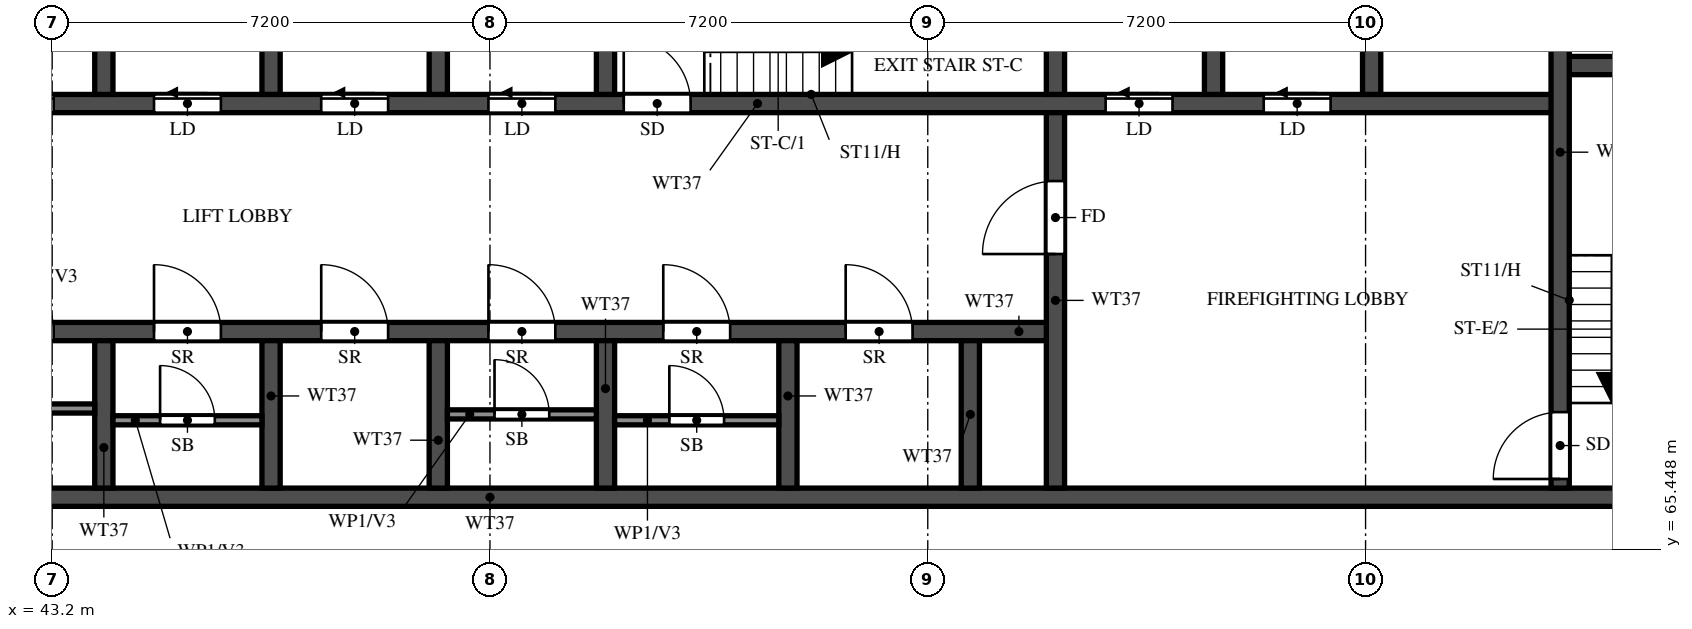
"""IFC4 building model, lengths in metres.
Left out: names, types, materials, properties, quantities, classifications, styles, units other than length and angle.
Written with IfcOpenShell. Run it as: python <this file> out.ifc"""

import sys

from ifc_helpers import new_model, si_unit, direction, frame, frame_2d, origin, place, context, subcontext, project, spatial, rectangle, extrude, element, fill, save


model = new_model("IFC4")
c1 = context("Model", 3, precision=1e-05, world=origin(), true_north=direction((0.0, 1.0)))
c2 = subcontext(c1, "Body", "Model", "MODEL_VIEW")
j1 = project(units=[si_unit("LENGTHUNIT", "METRE"), si_unit("PLANEANGLEUNIT", "RADIAN")], contexts=[c1])
p1 = place(None, origin())
s1 = spatial("IfcSite", under=j1, at=p1, CompositionType="ELEMENT")
p2 = place(p1, origin())
s2 = spatial("IfcBuilding", under=s1, at=p2, CompositionType="ELEMENT")
p3 = place(p2, frame((0.0, 0.0, 260.5)))
s3 = spatial("IfcBuildingStorey", under=s2, at=p3, CompositionType="ELEMENT", Elevation=260.5)
p4 = place(p3, frame((29.2, 66.3, 0.0), z_axis=(0.0, 0.0, 1.0), x_axis=(1.0, 0.0, 0.0)))
e1 = element("IfcWall", 1, at=p4, inside=s3, PredefinedType="SHEAR", context=c2, shape_type="SweptSolid", body=[
    extrude(rectangle(XDim=42.4, YDim=0.3, at=frame_2d((21.2, 0.0))), origin(), (0.0, 0.0, 1.0), 3.22),
])
p5 = place(p4, frame((1.425, 0.0, 0.0)))
e2 = element("IfcOpeningElement", 2, at=p5, cuts=e1, PredefinedType="OPENING", context=c2, shape_type="SweptSolid", body=[
    extrude(rectangle(XDim=1.1, YDim=2.1, at=frame_2d((0.55, 1.05))), frame((0.0, 0.16, 0.0), z_axis=(0.0, -1.0, 0.0), x_axis=(1.0, 0.0, 0.0)), (0.0, 0.0, 1.0), 0.32),
])
p6 = place(p4, frame((4.2, 0.0, 0.0)))
e3 = element("IfcOpeningElement", 3, at=p6, cuts=e1, PredefinedType="OPENING", context=c2, shape_type="SweptSolid", body=[
    extrude(rectangle(XDim=1.8, YDim=2.1, at=frame_2d((0.9, 1.05))), frame((0.0, 0.16, 0.0), z_axis=(0.0, -1.0, 0.0), x_axis=(1.0, 0.0, 0.0)), (0.0, 0.0, 1.0), 0.32),
])
p7 = place(p3, frame((35.65, 69.025, 0.0), z_axis=(0.0, 0.0, 1.0), x_axis=(1.0, 0.0, 0.0)))
e4 = element("IfcWall", 4, at=p7, inside=s3, PredefinedType="SHEAR", context=c2, shape_type="SweptSolid", body=[
    extrude(rectangle(XDim=24.05, YDim=0.3, at=frame_2d((12.025, 0.0))), origin(), (0.0, 0.0, 1.0), 3.22),
])
p8 = place(p7, frame((0.975, 0.0, 0.0)))
e5 = element("IfcOpeningElement", 5, at=p8, cuts=e4, PredefinedType="OPENING", context=c2, shape_type="SweptSolid", body=[
    extrude(rectangle(XDim=1.1, YDim=2.1, at=frame_2d((0.55, 1.05))), frame((0.0, 0.16, 0.0), z_axis=(0.0, -1.0, 0.0), x_axis=(1.0, 0.0, 0.0)), (0.0, 0.0, 1.0), 0.32),
])
p9 = place(p7, frame((3.725, 0.0, 0.0)))
e6 = element("IfcOpeningElement", 6, at=p9, cuts=e4, PredefinedType="OPENING", context=c2, shape_type="SweptSolid", body=[
    extrude(rectangle(XDim=1.1, YDim=2.1, at=frame_2d((0.55, 1.05))), frame((0.0, 0.16, 0.0), z_axis=(0.0, -1.0, 0.0), x_axis=(1.0, 0.0, 0.0)), (0.0, 0.0, 1.0), 0.32),
])
p10 = place(p7, frame((6.475, 0.0, 0.0)))
e7 = element("IfcOpeningElement", 7, at=p10, cuts=e4, PredefinedType="OPENING", context=c2, shape_type="SweptSolid", body=[
    extrude(rectangle(XDim=1.1, YDim=2.1, at=frame_2d((0.55, 1.05))), frame((0.0, 0.16, 0.0), z_axis=(0.0, -1.0, 0.0), x_axis=(1.0, 0.0, 0.0)), (0.0, 0.0, 1.0), 0.32),
])
p11 = place(p7, frame((9.225, 0.0, 0.0)))
e8 = element("IfcOpeningElement", 8, at=p11, cuts=e4, PredefinedType="OPENING", context=c2, shape_type="SweptSolid", body=[
    extrude(rectangle(XDim=1.1, YDim=2.1, at=frame_2d((0.55, 1.05))), frame((0.0, 0.16, 0.0), z_axis=(0.0, -1.0, 0.0), x_axis=(1.0, 0.0, 0.0)), (0.0, 0.0, 1.0), 0.32),
])
p12 = place(p7, frame((11.975, 0.0, 0.0)))
e9 = element("IfcOpeningElement", 9, at=p12, cuts=e4, PredefinedType="OPENING", context=c2, shape_type="SweptSolid", body=[
    extrude(rectangle(XDim=1.1, YDim=2.1, at=frame_2d((0.55, 1.05))), frame((0.0, 0.16, 0.0), z_axis=(0.0, -1.0, 0.0), x_axis=(1.0, 0.0, 0.0)), (0.0, 0.0, 1.0), 0.32),
])
p13 = place(p7, frame((14.725, 0.0, 0.0)))
e10 = element("IfcOpeningElement", 10, at=p13, cuts=e4, PredefinedType="OPENING", context=c2, shape_type="SweptSolid", body=[
    extrude(rectangle(XDim=1.1, YDim=2.1, at=frame_2d((0.55, 1.05))), frame((0.0, 0.16, 0.0), z_axis=(0.0, -1.0, 0.0), x_axis=(1.0, 0.0, 0.0)), (0.0, 0.0, 1.0), 0.32),
])
p14 = place(p7, frame((17.6, 0.0, 0.0)))
e11 = element("IfcOpeningElement", 11, at=p14, cuts=e4, PredefinedType="OPENING", context=c2, shape_type="SweptSolid", body=[
    extrude(rectangle(XDim=1.1, YDim=2.1, at=frame_2d((0.55, 1.05))), frame((0.0, 0.16, 0.0), z_axis=(0.0, -1.0, 0.0), x_axis=(1.0, 0.0, 0.0)), (0.0, 0.0, 1.0), 0.32),
])
p15 = place(p7, frame((20.6, 0.0, 0.0)))
e12 = element("IfcOpeningElement", 12, at=p15, cuts=e4, PredefinedType="OPENING", context=c2, shape_type="SweptSolid", body=[
    extrude(rectangle(XDim=1.1, YDim=2.1, at=frame_2d((0.55, 1.05))), frame((0.0, 0.16, 0.0), z_axis=(0.0, -1.0, 0.0), x_axis=(1.0, 0.0, 0.0)), (0.0, 0.0, 1.0), 0.32),
])
p16 = place(p3, frame((32.8, 72.775, 0.0), z_axis=(0.0, 0.0, 1.0), x_axis=(1.0, 0.0, 0.0)))
e13 = element("IfcWall", 13, at=p16, inside=s3, PredefinedType="SHEAR", context=c2, shape_type="SweptSolid", body=[
    extrude(rectangle(XDim=35.2, YDim=0.3, at=frame_2d((17.6, 0.0))), origin(), (0.0, 0.0, 1.0), 3.22),
])
p17 = place(p16, frame((19.8, 0.0, 0.0)))
e14 = element("IfcOpeningElement", 14, at=p17, cuts=e13, PredefinedType="OPENING", context=c2, shape_type="SweptSolid", body=[
    extrude(rectangle(XDim=1.1, YDim=2.1, at=frame_2d((0.55, 1.05))), frame((0.0, 0.16, 0.0), z_axis=(0.0, -1.0, 0.0), x_axis=(1.0, 0.0, 0.0)), (0.0, 0.0, 1.0), 0.32),
])
p18 = place(p16, frame((27.725, 0.0, 0.0)))
e15 = element("IfcOpeningElement", 15, at=p18, cuts=e13, PredefinedType="OPENING", context=c2, shape_type="SweptSolid", body=[
    extrude(rectangle(XDim=1.1, YDim=2.1, at=frame_2d((0.55, 1.05))), frame((0.0, 0.16, 0.0), z_axis=(0.0, -1.0, 0.0), x_axis=(1.0, 0.0, 0.0)), (0.0, 0.0, 1.0), 0.32),
])
p19 = place(p16, frame((30.325, 0.0, 0.0)))
e16 = element("IfcOpeningElement", 16, at=p19, cuts=e13, PredefinedType="OPENING", context=c2, shape_type="SweptSolid", body=[
    extrude(rectangle(XDim=1.1, YDim=2.1, at=frame_2d((0.55, 1.05))), frame((0.0, 0.16, 0.0), z_axis=(0.0, -1.0, 0.0), x_axis=(1.0, 0.0, 0.0)), (0.0, 0.0, 1.0), 0.32),
])
p20 = place(p16, frame((3.825, 0.0, 0.0)))
e17 = element("IfcOpeningElement", 17, at=p20, cuts=e13, PredefinedType="OPENING", context=c2, shape_type="SweptSolid", body=[
    extrude(rectangle(XDim=1.1, YDim=2.1, at=frame_2d((0.55, 1.05))), frame((0.0, 0.16, 0.0), z_axis=(0.0, -1.0, 0.0), x_axis=(1.0, 0.0, 0.0)), (0.0, 0.0, 1.0), 0.32),
])
p21 = place(p16, frame((6.575, 0.0, 0.0)))
e18 = element("IfcOpeningElement", 18, at=p21, cuts=e13, PredefinedType="OPENING", context=c2, shape_type="SweptSolid", body=[
    extrude(rectangle(XDim=1.1, YDim=2.1, at=frame_2d((0.55, 1.05))), frame((0.0, 0.16, 0.0), z_axis=(0.0, -1.0, 0.0), x_axis=(1.0, 0.0, 0.0)), (0.0, 0.0, 1.0), 0.32),
])
p22 = place(p16, frame((9.325, 0.0, 0.0)))
e19 = element("IfcOpeningElement", 19, at=p22, cuts=e13, PredefinedType="OPENING", context=c2, shape_type="SweptSolid", body=[
    extrude(rectangle(XDim=1.1, YDim=2.1, at=frame_2d((0.55, 1.05))), frame((0.0, 0.16, 0.0), z_axis=(0.0, -1.0, 0.0), x_axis=(1.0, 0.0, 0.0)), (0.0, 0.0, 1.0), 0.32),
])
p23 = place(p16, frame((12.075, 0.0, 0.0)))
e20 = element("IfcOpeningElement", 20, at=p23, cuts=e13, PredefinedType="OPENING", context=c2, shape_type="SweptSolid", body=[
    extrude(rectangle(XDim=1.1, YDim=2.1, at=frame_2d((0.55, 1.05))), frame((0.0, 0.16, 0.0), z_axis=(0.0, -1.0, 0.0), x_axis=(1.0, 0.0, 0.0)), (0.0, 0.0, 1.0), 0.32),
])
p24 = place(p16, frame((14.825, 0.0, 0.0)))
e21 = element("IfcOpeningElement", 21, at=p24, cuts=e13, PredefinedType="OPENING", context=c2, shape_type="SweptSolid", body=[
    extrude(rectangle(XDim=1.1, YDim=2.1, at=frame_2d((0.55, 1.05))), frame((0.0, 0.16, 0.0), z_axis=(0.0, -1.0, 0.0), x_axis=(1.0, 0.0, 0.0)), (0.0, 0.0, 1.0), 0.32),
])
p25 = place(p16, frame((17.575, 0.0, 0.0)))
e22 = element("IfcOpeningElement", 22, at=p25, cuts=e13, PredefinedType="OPENING", context=c2, shape_type="SweptSolid", body=[
    extrude(rectangle(XDim=1.1, YDim=2.1, at=frame_2d((0.55, 1.05))), frame((0.0, 0.16, 0.0), z_axis=(0.0, -1.0, 0.0), x_axis=(1.0, 0.0, 0.0)), (0.0, 0.0, 1.0), 0.32),
])
p26 = place(p16, frame((0.95, 0.0, 0.0)))
e23 = element("IfcOpeningElement", 23, at=p26, cuts=e13, PredefinedType="OPENING", context=c2, shape_type="SweptSolid", body=[
    extrude(rectangle(XDim=1.1, YDim=2.1, at=frame_2d((0.55, 1.05))), frame((0.0, 0.16, 0.0), z_axis=(0.0, -1.0, 0.0), x_axis=(1.0, 0.0, 0.0)), (0.0, 0.0, 1.0), 0.32),
])
p27 = place(p3, frame((68.0, 73.4, 0.0), z_axis=(0.0, 0.0, 1.0), x_axis=(1.0, 0.0, 0.0)))
e24 = element("IfcWall", 24, at=p27, inside=s3, PredefinedType="SHEAR", context=c2, shape_type="SweptSolid", body=[
    extrude(rectangle(XDim=3.1, YDim=0.3, at=frame_2d((1.55, 0.0))), origin(), (0.0, 0.0, 1.0), 3.22),
])
p28 = place(p3, frame((68.0, 66.45, 0.0), z_axis=(0.0, 0.0, 1.0), x_axis=(0.0, 1.0, 0.0)))
e25 = element("IfcWall", 25, at=p28, inside=s3, PredefinedType="SHEAR", context=c2, shape_type="SweptSolid", body=[
    extrude(rectangle(XDim=11.05, YDim=0.3, at=frame_2d((5.525, 0.0))), origin(), (0.0, 0.0, 1.0), 3.22),
])
p29 = place(p28, frame((0.15, 0.0, 0.0)))
e26 = element("IfcOpeningElement", 26, at=p29, cuts=e25, PredefinedType="OPENING", context=c2, shape_type="SweptSolid", body=[
    extrude(rectangle(XDim=1.1, YDim=2.1, at=frame_2d((0.55, 1.05))), frame((0.0, 0.16, 0.0), z_axis=(0.0, -1.0, 0.0), x_axis=(1.0, 0.0, 0.0)), (0.0, 0.0, 1.0), 0.32),
])
p30 = place(p3, frame((59.7, 66.45, 0.0), z_axis=(0.0, 0.0, 1.0), x_axis=(0.0, 1.0, 0.0)))
e27 = element("IfcWall", 27, at=p30, inside=s3, PredefinedType="SHEAR", context=c2, shape_type="SweptSolid", body=[
    extrude(rectangle(XDim=6.175, YDim=0.3, at=frame_2d((3.087, 0.0))), origin(), (0.0, 0.0, 1.0), 3.22),
])
p31 = place(p30, frame((3.85, 0.0, 0.0)))
e28 = element("IfcOpeningElement", 28, at=p31, cuts=e27, PredefinedType="OPENING", context=c2, shape_type="SweptSolid", body=[
    extrude(rectangle(XDim=1.2, YDim=2.1, at=frame_2d((0.6, 1.05))), frame((0.0, 0.16, 0.0), z_axis=(0.0, -1.0, 0.0), x_axis=(1.0, 0.0, 0.0)), (0.0, 0.0, 1.0), 0.32),
])
p32 = place(p3, frame((59.7, 72.925, 0.0), z_axis=(0.0, 0.0, 1.0), x_axis=(0.0, 1.0, 0.0)))
e29 = element("IfcWall", 29, at=p32, inside=s3, PredefinedType="SHEAR", context=c2, shape_type="SweptSolid", body=[
    extrude(rectangle(XDim=2.95, YDim=0.3, at=frame_2d((1.475, 0.0))), origin(), (0.0, 0.0, 1.0), 3.22),
])
for number, where, z_axis, x_axis in (
    (30, (44.05, 66.45, 0.0), (0.0, 0.0, 1.0), (0.0, 1.0, 0.0)),
    (31, (46.8, 66.45, 0.0), (0.0, 0.0, 1.0), (0.0, 1.0, 0.0)),
    (32, (49.55, 66.45, 0.0), (0.0, 0.0, 1.0), (0.0, 1.0, 0.0)),
    (33, (52.3, 66.45, 0.0), (0.0, 0.0, 1.0), (0.0, 1.0, 0.0)),
    (34, (55.3, 66.45, 0.0), (0.0, 0.0, 1.0), (0.0, 1.0, 0.0)),
    (35, (58.3, 66.45, 0.0), (0.0, 0.0, 1.0), (0.0, 1.0, 0.0)),
):
    element("IfcWall", number, at=place(p3, frame(where, z_axis=z_axis, x_axis=x_axis)), inside=s3, PredefinedType="SHEAR", context=c2, shape_type="SweptSolid", body=[
        extrude(rectangle(XDim=2.425, YDim=0.3, at=frame_2d((1.212, 0.0))), origin(), (0.0, 0.0, 1.0), 3.22),
    ])
for number, where, z_axis, x_axis in (
    (36, (44.05, 72.925, 0.0), (0.0, 0.0, 1.0), (0.0, 1.0, 0.0)),
    (37, (46.8, 72.925, 0.0), (0.0, 0.0, 1.0), (0.0, 1.0, 0.0)),
    (38, (49.55, 72.925, 0.0), (0.0, 0.0, 1.0), (0.0, 1.0, 0.0)),
    (39, (52.3, 72.925, 0.0), (0.0, 0.0, 1.0), (0.0, 1.0, 0.0)),
    (40, (62.3, 72.925, 0.0), (0.0, 0.0, 1.0), (0.0, 1.0, 0.0)),
    (41, (64.9, 72.925, 0.0), (0.0, 0.0, 1.0), (0.0, 1.0, 0.0)),
):
    element("IfcWall", number, at=place(p3, frame(where, z_axis=z_axis, x_axis=x_axis)), inside=s3, PredefinedType="SHEAR", context=c2, shape_type="SweptSolid", body=[
        extrude(rectangle(XDim=2.95, YDim=0.3, at=frame_2d((1.475, 0.0))), origin(), (0.0, 0.0, 1.0), 3.22),
    ])
p33 = place(p3, frame((41.45, 67.76, 0.0), z_axis=(0.0, 0.0, 1.0), x_axis=(1.0, 0.0, 0.0)))
e42 = element("IfcWall", 42, at=p33, inside=s3, PredefinedType="PARTITIONING", context=c2, shape_type="SweptSolid", body=[
    extrude(rectangle(XDim=2.45, YDim=0.15, at=frame_2d((1.225, 0.0))), origin(), (0.0, 0.0, 1.0), 3.22),
])
p34 = place(p33, frame((0.775, 0.0, 0.0)))
e43 = element("IfcOpeningElement", 43, at=p34, cuts=e42, PredefinedType="OPENING", context=c2, shape_type="SweptSolid", body=[
    extrude(rectangle(XDim=0.9, YDim=2.1, at=frame_2d((0.45, 1.05))), frame((0.0, 0.085, 0.0), z_axis=(0.0, -1.0, 0.0), x_axis=(1.0, 0.0, 0.0)), (0.0, 0.0, 1.0), 0.17),
])
p35 = place(p3, frame((44.2, 67.565, 0.0), z_axis=(0.0, 0.0, 1.0), x_axis=(1.0, 0.0, 0.0)))
e44 = element("IfcWall", 44, at=p35, inside=s3, PredefinedType="PARTITIONING", context=c2, shape_type="SweptSolid", body=[
    extrude(rectangle(XDim=2.45, YDim=0.15, at=frame_2d((1.225, 0.0))), origin(), (0.0, 0.0, 1.0), 3.22),
])
p36 = place(p35, frame((0.775, 0.0, 0.0)))
e45 = element("IfcOpeningElement", 45, at=p36, cuts=e44, PredefinedType="OPENING", context=c2, shape_type="SweptSolid", body=[
    extrude(rectangle(XDim=0.9, YDim=2.1, at=frame_2d((0.45, 1.05))), frame((0.0, 0.085, 0.0), z_axis=(0.0, -1.0, 0.0), x_axis=(1.0, 0.0, 0.0)), (0.0, 0.0, 1.0), 0.17),
])
p37 = place(p3, frame((49.7, 67.663, 0.0), z_axis=(0.0, 0.0, 1.0), x_axis=(1.0, 0.0, 0.0)))
e46 = element("IfcWall", 46, at=p37, inside=s3, PredefinedType="PARTITIONING", context=c2, shape_type="SweptSolid", body=[
    extrude(rectangle(XDim=2.45, YDim=0.15, at=frame_2d((1.225, 0.0))), origin(), (0.0, 0.0, 1.0), 3.22),
])
p38 = place(p37, frame((0.775, 0.0, 0.0)))
e47 = element("IfcOpeningElement", 47, at=p38, cuts=e46, PredefinedType="OPENING", context=c2, shape_type="SweptSolid", body=[
    extrude(rectangle(XDim=0.9, YDim=2.1, at=frame_2d((0.45, 1.05))), frame((0.0, 0.085, 0.0), z_axis=(0.0, -1.0, 0.0), x_axis=(1.0, 0.0, 0.0)), (0.0, 0.0, 1.0), 0.17),
])
p39 = place(p3, frame((52.45, 67.565, 0.0), z_axis=(0.0, 0.0, 1.0), x_axis=(1.0, 0.0, 0.0)))
e48 = element("IfcWall", 48, at=p39, inside=s3, PredefinedType="PARTITIONING", context=c2, shape_type="SweptSolid", body=[
    extrude(rectangle(XDim=2.7, YDim=0.15, at=frame_2d((1.35, 0.0))), origin(), (0.0, 0.0, 1.0), 3.22),
])
p40 = place(p39, frame((0.9, 0.0, 0.0)))
e49 = element("IfcOpeningElement", 49, at=p40, cuts=e48, PredefinedType="OPENING", context=c2, shape_type="SweptSolid", body=[
    extrude(rectangle(XDim=0.9, YDim=2.1, at=frame_2d((0.45, 1.05))), frame((0.0, 0.085, 0.0), z_axis=(0.0, -1.0, 0.0), x_axis=(1.0, 0.0, 0.0)), (0.0, 0.0, 1.0), 0.17),
])
p41 = place(p17, origin())
e50 = element("IfcDoor", 50, at=p41, inside=s3, OperationType="SINGLE_SWING_LEFT", PredefinedType="DOOR", context=c2, shape_type="SweptSolid", body=[
    extrude(rectangle(XDim=1.1, YDim=2.1, at=frame_2d((0.55, 1.05))), frame((0.0, 0.025, 0.0), z_axis=(0.0, -1.0, 0.0), x_axis=(1.0, 0.0, 0.0)), (0.0, 0.0, 1.0), 0.05),
])
fill(e14, e50)
p42 = place(p29, origin())
e51 = element("IfcDoor", 51, at=p42, inside=s3, OperationType="SINGLE_SWING_RIGHT", PredefinedType="DOOR", context=c2, shape_type="SweptSolid", body=[
    extrude(rectangle(XDim=1.1, YDim=2.1, at=frame_2d((0.55, 1.05))), frame((0.0, 0.025, 0.0), z_axis=(0.0, -1.0, 0.0), x_axis=(1.0, 0.0, 0.0)), (0.0, 0.0, 1.0), 0.05),
])
fill(e26, e51)
p43 = place(p31, origin())
e52 = element("IfcDoor", 52, at=p43, inside=s3, OperationType="SINGLE_SWING_LEFT", PredefinedType="DOOR", context=c2, shape_type="SweptSolid", body=[
    extrude(rectangle(XDim=1.2, YDim=2.1, at=frame_2d((0.6, 1.05))), frame((0.0, 0.025, 0.0), z_axis=(0.0, -1.0, 0.0), x_axis=(1.0, 0.0, 0.0)), (0.0, 0.0, 1.0), 0.05),
])
fill(e28, e52)
p44 = place(p18, origin())
e53 = element("IfcDoor", 53, at=p44, inside=s3, OperationType="SLIDING_TO_LEFT", PredefinedType="DOOR", context=c2, shape_type="SweptSolid", body=[
    extrude(rectangle(XDim=1.1, YDim=2.1, at=frame_2d((0.55, 1.05))), frame((0.0, 0.025, 0.0), z_axis=(0.0, -1.0, 0.0), x_axis=(1.0, 0.0, 0.0)), (0.0, 0.0, 1.0), 0.05),
])
fill(e15, e53)
p45 = place(p19, origin())
e54 = element("IfcDoor", 54, at=p45, inside=s3, OperationType="SLIDING_TO_LEFT", PredefinedType="DOOR", context=c2, shape_type="SweptSolid", body=[
    extrude(rectangle(XDim=1.1, YDim=2.1, at=frame_2d((0.55, 1.05))), frame((0.0, 0.025, 0.0), z_axis=(0.0, -1.0, 0.0), x_axis=(1.0, 0.0, 0.0)), (0.0, 0.0, 1.0), 0.05),
])
fill(e16, e54)
p46 = place(p10, origin())
e55 = element("IfcDoor", 55, at=p46, inside=s3, OperationType="SINGLE_SWING_RIGHT", PredefinedType="DOOR", context=c2, shape_type="SweptSolid", body=[
    extrude(rectangle(XDim=1.1, YDim=2.1, at=frame_2d((0.55, 1.05))), frame((0.0, 0.025, 0.0), z_axis=(0.0, -1.0, 0.0), x_axis=(1.0, 0.0, 0.0)), (0.0, 0.0, 1.0), 0.05),
])
fill(e7, e55)
p47 = place(p11, origin())
e56 = element("IfcDoor", 56, at=p47, inside=s3, OperationType="SINGLE_SWING_LEFT", PredefinedType="DOOR", context=c2, shape_type="SweptSolid", body=[
    extrude(rectangle(XDim=1.1, YDim=2.1, at=frame_2d((0.55, 1.05))), frame((0.0, 0.025, 0.0), z_axis=(0.0, -1.0, 0.0), x_axis=(1.0, 0.0, 0.0)), (0.0, 0.0, 1.0), 0.05),
])
fill(e8, e56)
p48 = place(p36, origin())
e57 = element("IfcDoor", 57, at=p48, inside=s3, OperationType="SINGLE_SWING_LEFT", PredefinedType="DOOR", context=c2, shape_type="SweptSolid", body=[
    extrude(rectangle(XDim=0.9, YDim=2.1, at=frame_2d((0.45, 1.05))), frame((0.0, 0.025, 0.0), z_axis=(0.0, -1.0, 0.0), x_axis=(1.0, 0.0, 0.0)), (0.0, 0.0, 1.0), 0.05),
])
fill(e45, e57)
p49 = place(p12, origin())
e58 = element("IfcDoor", 58, at=p49, inside=s3, OperationType="SINGLE_SWING_RIGHT", PredefinedType="DOOR", context=c2, shape_type="SweptSolid", body=[
    extrude(rectangle(XDim=1.1, YDim=2.1, at=frame_2d((0.55, 1.05))), frame((0.0, 0.025, 0.0), z_axis=(0.0, -1.0, 0.0), x_axis=(1.0, 0.0, 0.0)), (0.0, 0.0, 1.0), 0.05),
])
fill(e9, e58)
p50 = place(p13, origin())
e59 = element("IfcDoor", 59, at=p50, inside=s3, OperationType="SINGLE_SWING_LEFT", PredefinedType="DOOR", context=c2, shape_type="SweptSolid", body=[
    extrude(rectangle(XDim=1.1, YDim=2.1, at=frame_2d((0.55, 1.05))), frame((0.0, 0.025, 0.0), z_axis=(0.0, -1.0, 0.0), x_axis=(1.0, 0.0, 0.0)), (0.0, 0.0, 1.0), 0.05),
])
fill(e10, e59)
p51 = place(p38, origin())
e60 = element("IfcDoor", 60, at=p51, inside=s3, OperationType="SINGLE_SWING_LEFT", PredefinedType="DOOR", context=c2, shape_type="SweptSolid", body=[
    extrude(rectangle(XDim=0.9, YDim=2.1, at=frame_2d((0.45, 1.05))), frame((0.0, 0.025, 0.0), z_axis=(0.0, -1.0, 0.0), x_axis=(1.0, 0.0, 0.0)), (0.0, 0.0, 1.0), 0.05),
])
fill(e47, e60)
p52 = place(p14, origin())
e61 = element("IfcDoor", 61, at=p52, inside=s3, OperationType="SINGLE_SWING_RIGHT", PredefinedType="DOOR", context=c2, shape_type="SweptSolid", body=[
    extrude(rectangle(XDim=1.1, YDim=2.1, at=frame_2d((0.55, 1.05))), frame((0.0, 0.025, 0.0), z_axis=(0.0, -1.0, 0.0), x_axis=(1.0, 0.0, 0.0)), (0.0, 0.0, 1.0), 0.05),
])
fill(e11, e61)
p53 = place(p40, origin())
e62 = element("IfcDoor", 62, at=p53, inside=s3, OperationType="SINGLE_SWING_RIGHT", PredefinedType="DOOR", context=c2, shape_type="SweptSolid", body=[
    extrude(rectangle(XDim=0.9, YDim=2.1, at=frame_2d((0.45, 1.05))), frame((0.0, 0.025, 0.0), z_axis=(0.0, -1.0, 0.0), x_axis=(1.0, 0.0, 0.0)), (0.0, 0.0, 1.0), 0.05),
])
fill(e49, e62)
p54 = place(p15, origin())
e63 = element("IfcDoor", 63, at=p54, inside=s3, OperationType="SINGLE_SWING_RIGHT", PredefinedType="DOOR", context=c2, shape_type="SweptSolid", body=[
    extrude(rectangle(XDim=1.1, YDim=2.1, at=frame_2d((0.55, 1.05))), frame((0.0, 0.025, 0.0), z_axis=(0.0, -1.0, 0.0), x_axis=(1.0, 0.0, 0.0)), (0.0, 0.0, 1.0), 0.05),
])
fill(e12, e63)
p55 = place(p22, origin())
e64 = element("IfcDoor", 64, at=p55, inside=s3, OperationType="SLIDING_TO_LEFT", PredefinedType="DOOR", context=c2, shape_type="SweptSolid", body=[
    extrude(rectangle(XDim=1.1, YDim=2.1, at=frame_2d((0.55, 1.05))), frame((0.0, 0.025, 0.0), z_axis=(0.0, -1.0, 0.0), x_axis=(1.0, 0.0, 0.0)), (0.0, 0.0, 1.0), 0.05),
])
fill(e19, e64)
p56 = place(p23, origin())
e65 = element("IfcDoor", 65, at=p56, inside=s3, OperationType="SLIDING_TO_LEFT", PredefinedType="DOOR", context=c2, shape_type="SweptSolid", body=[
    extrude(rectangle(XDim=1.1, YDim=2.1, at=frame_2d((0.55, 1.05))), frame((0.0, 0.025, 0.0), z_axis=(0.0, -1.0, 0.0), x_axis=(1.0, 0.0, 0.0)), (0.0, 0.0, 1.0), 0.05),
])
fill(e20, e65)
p57 = place(p24, origin())
e66 = element("IfcDoor", 66, at=p57, inside=s3, OperationType="SLIDING_TO_LEFT", PredefinedType="DOOR", context=c2, shape_type="SweptSolid", body=[
    extrude(rectangle(XDim=1.1, YDim=2.1, at=frame_2d((0.55, 1.05))), frame((0.0, 0.025, 0.0), z_axis=(0.0, -1.0, 0.0), x_axis=(1.0, 0.0, 0.0)), (0.0, 0.0, 1.0), 0.05),
])
fill(e21, e66)
p58 = place(p25, origin())
e67 = element("IfcDoor", 67, at=p58, inside=s3, OperationType="SLIDING_TO_LEFT", PredefinedType="DOOR", context=c2, shape_type="SweptSolid", body=[
    extrude(rectangle(XDim=1.1, YDim=2.1, at=frame_2d((0.55, 1.05))), frame((0.0, 0.025, 0.0), z_axis=(0.0, -1.0, 0.0), x_axis=(1.0, 0.0, 0.0)), (0.0, 0.0, 1.0), 0.05),
])
fill(e22, e67)
save(model, sys.argv[1])
